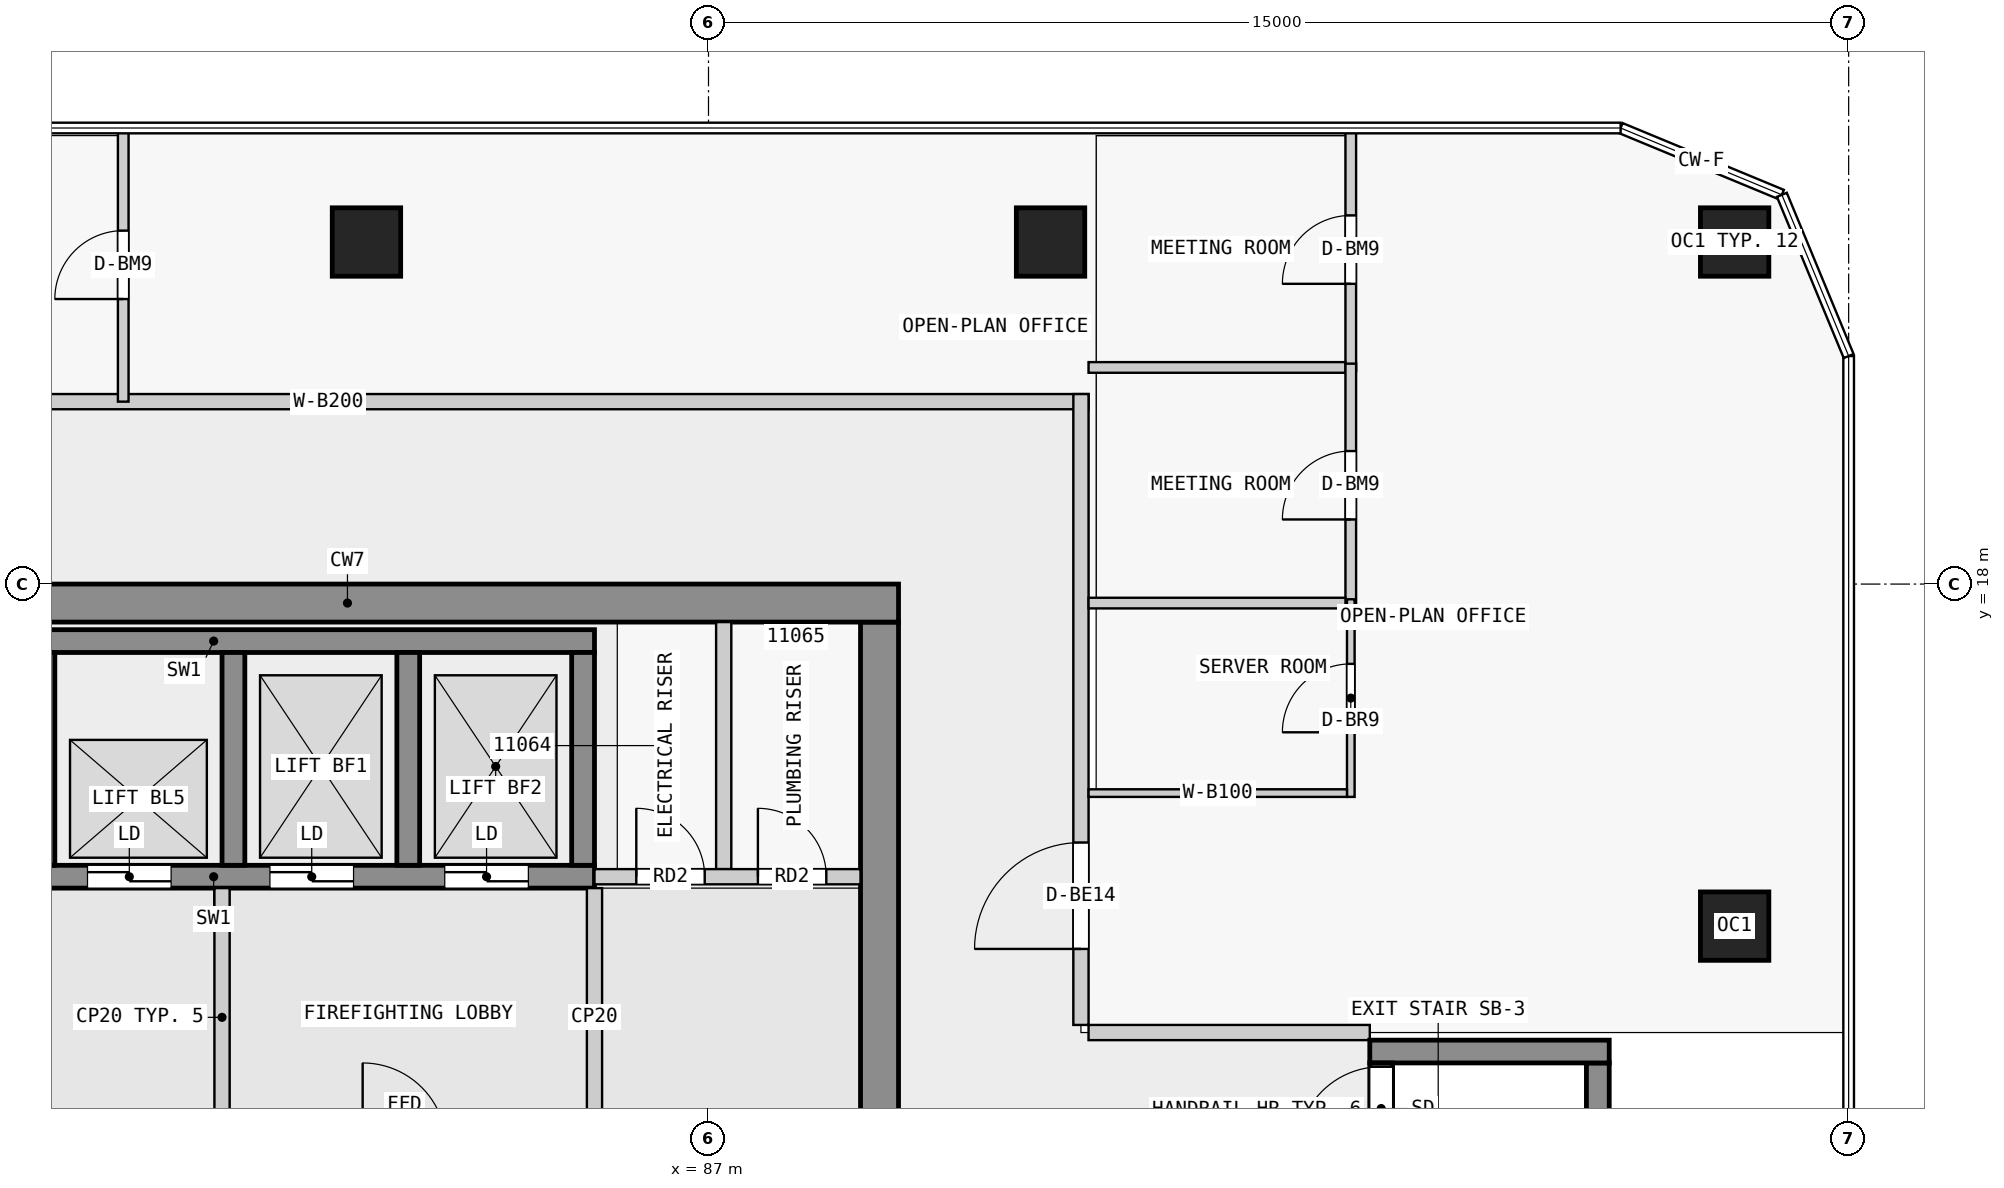
"""IFC4 building model, lengths in metres.
Left out: names, types, materials, properties, quantities, classifications, styles, units other than length and angle.
Written with IfcOpenShell. Run it as: python <this file> out.ifc"""

import sys

from ifc_helpers import new_model, si_unit, direction, frame, frame_2d, origin, origin_2d, place, context, subcontext, project, spatial, rectangle, extrude, element, fill, save


model = new_model("IFC4")
c1 = context("Model", 3, precision=1e-05, world=origin(), true_north=direction((0.0, 1.0)))
c2 = subcontext(c1, "Body", "Model", "MODEL_VIEW")
j1 = project(units=[si_unit("LENGTHUNIT", "METRE"), si_unit("PLANEANGLEUNIT", "RADIAN")], contexts=[c1])
p1 = place(None, origin())
s1 = spatial("IfcSite", under=j1, at=p1, CompositionType="ELEMENT")
p2 = place(p1, origin())
s2 = spatial("IfcBuilding", under=s1, at=p2, CompositionType="ELEMENT")
p3 = place(p2, frame((0.0, 0.0, 47.8)))
s3 = spatial("IfcBuildingStorey", under=s2, at=p3, CompositionType="ELEMENT", Elevation=47.8)
for number, where, z_axis, x_axis in (
    (1, (100.5, 13.5, 0.0), (0.0, 0.0, 1.0), (1.0, 0.0, 0.0)),
    (2, (100.5, 22.5, 0.0), (0.0, 0.0, 1.0), (1.0, 0.0, 0.0)),
    (3, (91.5, 22.5, 0.0), (0.0, 0.0, 1.0), (1.0, 0.0, 0.0)),
    (4, (82.5, 22.5, 0.0), (0.0, 0.0, 1.0), (1.0, 0.0, 0.0)),
):
    element("IfcColumn", number, at=place(p3, frame(where, z_axis=z_axis, x_axis=x_axis)), inside=s3, PredefinedType="COLUMN", context=c2, shape_type="SweptSolid", body=[
        extrude(rectangle(XDim=0.9, YDim=0.9, at=origin_2d()), origin(), (0.0, 0.0, 1.0), 3.5),
    ])
p4 = place(p3, frame((75.0, 17.75, 0.0), z_axis=(0.0, 0.0, 1.0), x_axis=(1.0, 0.0, 0.0)))
e5 = element("IfcWall", 5, at=p4, inside=s3, PredefinedType="SHEAR", context=c2, shape_type="SweptSolid", body=[
    extrude(rectangle(XDim=14.5, YDim=0.5, at=frame_2d((7.25, 0.0))), origin(), (0.0, 0.0, 1.0), 3.25),
])
p5 = place(p3, frame((89.25, 0.5, 0.0), z_axis=(0.0, 0.0, 1.0), x_axis=(0.0, 1.0, 0.0)))
e6 = element("IfcWall", 6, at=p5, inside=s3, PredefinedType="SHEAR", context=c2, shape_type="SweptSolid", body=[
    extrude(rectangle(XDim=17.0, YDim=0.5, at=frame_2d((8.5, 0.0))), origin(), (0.0, 0.0, 1.0), 3.25),
])
p6 = place(p5, frame((7.6, 0.0, 0.0)))
e7 = element("IfcOpeningElement", 7, at=p6, cuts=e6, PredefinedType="OPENING", context=c2, shape_type="SweptSolid", body=[
    extrude(rectangle(XDim=1.8, YDim=2.1, at=frame_2d((0.9, 1.05))), frame((0.0, 0.26, 0.0), z_axis=(0.0, -1.0, 0.0), x_axis=(1.0, 0.0, 0.0)), (0.0, 0.0, 1.0), 0.52),
])
p7 = place(p3, frame((75.48, 17.25, 0.0), z_axis=(0.0, 0.0, 1.0), x_axis=(1.0, 0.0, 0.0)))
e8 = element("IfcWall", 8, at=p7, inside=s3, PredefinedType="SHEAR", context=c2, shape_type="SweptSolid", body=[
    extrude(rectangle(XDim=10.02, YDim=0.3, at=frame_2d((5.01, 0.0))), origin(), (0.0, 0.0, 1.0), 3.25),
])
p8 = place(p3, frame((75.48, 14.15, 0.0), z_axis=(0.0, 0.0, 1.0), x_axis=(1.0, 0.0, 0.0)))
e9 = element("IfcWall", 9, at=p8, inside=s3, PredefinedType="SHEAR", context=c2, shape_type="SweptSolid", body=[
    extrude(rectangle(XDim=10.02, YDim=0.3, at=frame_2d((5.01, 0.0))), origin(), (0.0, 0.0, 1.0), 3.25),
])
p9 = place(p8, frame((0.85, 0.0, 0.0)))
e10 = element("IfcOpeningElement", 10, at=p9, cuts=e9, PredefinedType="OPENING", context=c2, shape_type="SweptSolid", body=[
    extrude(rectangle(XDim=1.1, YDim=2.1, at=frame_2d((0.55, 1.05))), frame((0.0, 0.16, 0.0), z_axis=(0.0, -1.0, 0.0), x_axis=(1.0, 0.0, 0.0)), (0.0, 0.0, 1.0), 0.32),
])
p10 = place(p8, frame((3.35, 0.0, 0.0)))
e11 = element("IfcOpeningElement", 11, at=p10, cuts=e9, PredefinedType="OPENING", context=c2, shape_type="SweptSolid", body=[
    extrude(rectangle(XDim=1.1, YDim=2.1, at=frame_2d((0.55, 1.05))), frame((0.0, 0.16, 0.0), z_axis=(0.0, -1.0, 0.0), x_axis=(1.0, 0.0, 0.0)), (0.0, 0.0, 1.0), 0.32),
])
p11 = place(p8, frame((5.75, 0.0, 0.0)))
e12 = element("IfcOpeningElement", 12, at=p11, cuts=e9, PredefinedType="OPENING", context=c2, shape_type="SweptSolid", body=[
    extrude(rectangle(XDim=1.1, YDim=2.1, at=frame_2d((0.55, 1.05))), frame((0.0, 0.16, 0.0), z_axis=(0.0, -1.0, 0.0), x_axis=(1.0, 0.0, 0.0)), (0.0, 0.0, 1.0), 0.32),
])
p12 = place(p8, frame((8.05, 0.0, 0.0)))
e13 = element("IfcOpeningElement", 13, at=p12, cuts=e9, PredefinedType="OPENING", context=c2, shape_type="SweptSolid", body=[
    extrude(rectangle(XDim=1.1, YDim=2.1, at=frame_2d((0.55, 1.05))), frame((0.0, 0.16, 0.0), z_axis=(0.0, -1.0, 0.0), x_axis=(1.0, 0.0, 0.0)), (0.0, 0.0, 1.0), 0.32),
])
for number, where, z_axis, x_axis in (
    (14, (78.25, 14.3, 0.0), (0.0, 0.0, 1.0), (0.0, 1.0, 0.0)),
    (15, (80.75, 14.3, 0.0), (0.0, 0.0, 1.0), (0.0, 1.0, 0.0)),
    (16, (83.05, 14.3, 0.0), (0.0, 0.0, 1.0), (0.0, 1.0, 0.0)),
    (17, (85.35, 14.3, 0.0), (0.0, 0.0, 1.0), (0.0, 1.0, 0.0)),
):
    element("IfcWall", number, at=place(p3, frame(where, z_axis=z_axis, x_axis=x_axis)), inside=s3, PredefinedType="SHEAR", context=c2, shape_type="SweptSolid", body=[
        extrude(rectangle(XDim=2.8, YDim=0.3, at=frame_2d((1.4, 0.0))), origin(), (0.0, 0.0, 1.0), 3.25),
    ])
p13 = place(p3, frame((95.85, 5.3, 0.0), z_axis=(0.0, 0.0, 1.0), x_axis=(0.0, 1.0, 0.0)))
e18 = element("IfcWall", 18, at=p13, inside=s3, PredefinedType="SHEAR", context=c2, shape_type="SweptSolid", body=[
    extrude(rectangle(XDim=6.4, YDim=0.3, at=frame_2d((3.2, 0.0))), origin(), (0.0, 0.0, 1.0), 3.25),
])
p14 = place(p13, frame((5.25, 0.0, 0.0)))
e19 = element("IfcOpeningElement", 19, at=p14, cuts=e18, PredefinedType="OPENING", context=c2, shape_type="SweptSolid", body=[
    extrude(rectangle(XDim=1.1, YDim=2.1, at=frame_2d((0.55, 1.05))), frame((0.0, 0.16, 0.0), z_axis=(0.0, -1.0, 0.0), x_axis=(1.0, 0.0, 0.0)), (0.0, 0.0, 1.0), 0.32),
])
p15 = place(p3, frame((98.7, 5.3, 0.0), z_axis=(0.0, 0.0, 1.0), x_axis=(0.0, 1.0, 0.0)))
e20 = element("IfcWall", 20, at=p15, inside=s3, PredefinedType="SHEAR", context=c2, shape_type="SweptSolid", body=[
    extrude(rectangle(XDim=6.4, YDim=0.3, at=frame_2d((3.2, 0.0))), origin(), (0.0, 0.0, 1.0), 3.25),
])
p16 = place(p3, frame((95.7, 11.85, 0.0), z_axis=(0.0, 0.0, 1.0), x_axis=(1.0, 0.0, 0.0)))
e21 = element("IfcWall", 21, at=p16, inside=s3, PredefinedType="SHEAR", context=c2, shape_type="SweptSolid", body=[
    extrude(rectangle(XDim=3.15, YDim=0.3, at=frame_2d((1.575, 0.0))), origin(), (0.0, 0.0, 1.0), 3.25),
])
for number, where, z_axis, x_axis in (
    (22, (80.6, 10.6, 0.0), (0.0, 0.0, 1.0), (0.0, 1.0, 0.0)),
    (23, (85.5, 10.6, 0.0), (0.0, 0.0, 1.0), (0.0, 1.0, 0.0)),
):
    element("IfcWall", number, at=place(p3, frame(where, z_axis=z_axis, x_axis=x_axis)), inside=s3, PredefinedType="PARTITIONING", context=c2, shape_type="SweptSolid", body=[
        extrude(rectangle(XDim=3.4, YDim=0.2, at=frame_2d((1.7, 0.0))), origin(), (0.0, 0.0, 1.0), 3.25),
    ])
p17 = place(p3, frame((85.5, 14.15, 0.0), z_axis=(0.0, 0.0, 1.0), x_axis=(1.0, 0.0, 0.0)))
e24 = element("IfcWall", 24, at=p17, inside=s3, PredefinedType="PARTITIONING", context=c2, shape_type="SweptSolid", body=[
    extrude(rectangle(XDim=3.5, YDim=0.2, at=frame_2d((1.75, 0.0))), origin(), (0.0, 0.0, 1.0), 3.25),
])
p18 = place(p17, frame((0.55, 0.0, 0.0)))
e25 = element("IfcOpeningElement", 25, at=p18, cuts=e24, PredefinedType="OPENING", context=c2, shape_type="SweptSolid", body=[
    extrude(rectangle(XDim=0.9, YDim=2.1, at=frame_2d((0.45, 1.05))), frame((0.0, 0.11, 0.0), z_axis=(0.0, -1.0, 0.0), x_axis=(1.0, 0.0, 0.0)), (0.0, 0.0, 1.0), 0.22),
])
p19 = place(p17, frame((2.15, 0.0, 0.0)))
e26 = element("IfcOpeningElement", 26, at=p19, cuts=e24, PredefinedType="OPENING", context=c2, shape_type="SweptSolid", body=[
    extrude(rectangle(XDim=0.9, YDim=2.1, at=frame_2d((0.45, 1.05))), frame((0.0, 0.11, 0.0), z_axis=(0.0, -1.0, 0.0), x_axis=(1.0, 0.0, 0.0)), (0.0, 0.0, 1.0), 0.22),
])
p20 = place(p3, frame((87.2, 14.25, 0.0), z_axis=(0.0, 0.0, 1.0), x_axis=(0.0, 1.0, 0.0)))
e27 = element("IfcWall", 27, at=p20, inside=s3, PredefinedType="PARTITIONING", context=c2, shape_type="SweptSolid", body=[
    extrude(rectangle(XDim=3.25, YDim=0.2, at=frame_2d((1.625, 0.0))), origin(), (0.0, 0.0, 1.0), 3.25),
])
p21 = place(p3, frame((72.0, 20.4, 0.0), z_axis=(0.0, 0.0, 1.0), x_axis=(1.0, 0.0, 0.0)))
e28 = element("IfcWall", 28, at=p21, inside=s3, PredefinedType="PARTITIONING", context=c2, shape_type="SweptSolid", body=[
    extrude(rectangle(XDim=20.0, YDim=0.2, at=frame_2d((10.0, 0.0))), origin(), (0.0, 0.0, 1.0), 3.25),
])
p22 = place(p3, frame((91.9, 12.2, 0.0), z_axis=(0.0, 0.0, 1.0), x_axis=(0.0, 1.0, 0.0)))
e29 = element("IfcWall", 29, at=p22, inside=s3, PredefinedType="PARTITIONING", context=c2, shape_type="SweptSolid", body=[
    extrude(rectangle(XDim=8.3, YDim=0.2, at=frame_2d((4.15, 0.0))), origin(), (0.0, 0.0, 1.0), 3.25),
])
p23 = place(p22, frame((1.0, 0.0, 0.0)))
e30 = element("IfcOpeningElement", 30, at=p23, cuts=e29, PredefinedType="OPENING", context=c2, shape_type="SweptSolid", body=[
    extrude(rectangle(XDim=1.4, YDim=2.4, at=frame_2d((0.7, 1.2))), frame((0.0, 0.11, 0.0), z_axis=(0.0, -1.0, 0.0), x_axis=(1.0, 0.0, 0.0)), (0.0, 0.0, 1.0), 0.22),
])
p24 = place(p3, frame((92.0, 12.1, 0.0), z_axis=(0.0, 0.0, 1.0), x_axis=(1.0, 0.0, 0.0)))
e31 = element("IfcWall", 31, at=p24, inside=s3, PredefinedType="PARTITIONING", context=c2, shape_type="SweptSolid", body=[
    extrude(rectangle(XDim=3.7, YDim=0.2, at=frame_2d((1.85, 0.0))), origin(), (0.0, 0.0, 1.0), 3.25),
])
p25 = place(p3, frame((95.45, 20.8, 0.0), z_axis=(0.0, 0.0, 1.0), x_axis=(0.0, 1.0, 0.0)))
e32 = element("IfcWall", 32, at=p25, inside=s3, PredefinedType="PARTITIONING", context=c2, shape_type="SweptSolid", body=[
    extrude(rectangle(XDim=3.2, YDim=0.14, at=frame_2d((1.6, 0.0))), origin(), (0.0, 0.0, 1.0), 3.25),
])
p26 = place(p25, frame((1.15, 0.0, 0.0)))
e33 = element("IfcOpeningElement", 33, at=p26, cuts=e32, PredefinedType="OPENING", context=c2, shape_type="SweptSolid", body=[
    extrude(rectangle(XDim=0.9, YDim=2.4, at=frame_2d((0.45, 1.2))), frame((0.0, 0.08, 0.0), z_axis=(0.0, -1.0, 0.0), x_axis=(1.0, 0.0, 0.0)), (0.0, 0.0, 1.0), 0.16),
])
p27 = place(p3, frame((92.0, 20.85, 0.0), z_axis=(0.0, 0.0, 1.0), x_axis=(1.0, 0.0, 0.0)))
e34 = element("IfcWall", 34, at=p27, inside=s3, PredefinedType="PARTITIONING", context=c2, shape_type="SweptSolid", body=[
    extrude(rectangle(XDim=3.38, YDim=0.14, at=frame_2d((1.69, 0.0))), origin(), (0.0, 0.0, 1.0), 3.25),
])
p28 = place(p3, frame((95.45, 17.7, 0.0), z_axis=(0.0, 0.0, 1.0), x_axis=(0.0, 1.0, 0.0)))
e35 = element("IfcWall", 35, at=p28, inside=s3, PredefinedType="PARTITIONING", context=c2, shape_type="SweptSolid", body=[
    extrude(rectangle(XDim=3.2, YDim=0.14, at=frame_2d((1.6, 0.0))), origin(), (0.0, 0.0, 1.0), 3.25),
])
p29 = place(p28, frame((1.15, 0.0, 0.0)))
e36 = element("IfcOpeningElement", 36, at=p29, cuts=e35, PredefinedType="OPENING", context=c2, shape_type="SweptSolid", body=[
    extrude(rectangle(XDim=0.9, YDim=2.4, at=frame_2d((0.45, 1.2))), frame((0.0, 0.08, 0.0), z_axis=(0.0, -1.0, 0.0), x_axis=(1.0, 0.0, 0.0)), (0.0, 0.0, 1.0), 0.16),
])
p30 = place(p3, frame((92.0, 17.75, 0.0), z_axis=(0.0, 0.0, 1.0), x_axis=(1.0, 0.0, 0.0)))
e37 = element("IfcWall", 37, at=p30, inside=s3, PredefinedType="PARTITIONING", context=c2, shape_type="SweptSolid", body=[
    extrude(rectangle(XDim=3.38, YDim=0.14, at=frame_2d((1.69, 0.0))), origin(), (0.0, 0.0, 1.0), 3.25),
])
p31 = place(p3, frame((95.45, 15.2, 0.0), z_axis=(0.0, 0.0, 1.0), x_axis=(0.0, 1.0, 0.0)))
e38 = element("IfcWall", 38, at=p31, inside=s3, PredefinedType="PARTITIONING", context=c2, shape_type="SweptSolid", body=[
    extrude(rectangle(XDim=2.6, YDim=0.1, at=frame_2d((1.3, 0.0))), origin(), (0.0, 0.0, 1.0), 3.25),
])
p32 = place(p31, frame((0.85, 0.0, 0.0)))
e39 = element("IfcOpeningElement", 39, at=p32, cuts=e38, PredefinedType="OPENING", context=c2, shape_type="SweptSolid", body=[
    extrude(rectangle(XDim=0.9, YDim=2.1, at=frame_2d((0.45, 1.05))), frame((0.0, 0.06, 0.0), z_axis=(0.0, -1.0, 0.0), x_axis=(1.0, 0.0, 0.0)), (0.0, 0.0, 1.0), 0.12),
])
p33 = place(p3, frame((92.0, 15.25, 0.0), z_axis=(0.0, 0.0, 1.0), x_axis=(1.0, 0.0, 0.0)))
e40 = element("IfcWall", 40, at=p33, inside=s3, PredefinedType="PARTITIONING", context=c2, shape_type="SweptSolid", body=[
    extrude(rectangle(XDim=3.4, YDim=0.1, at=frame_2d((1.7, 0.0))), origin(), (0.0, 0.0, 1.0), 3.25),
])
p34 = place(p3, frame((79.3, 20.4, 0.0), z_axis=(0.0, 0.0, 1.0), x_axis=(0.0, 1.0, 0.0)))
e41 = element("IfcWall", 41, at=p34, inside=s3, PredefinedType="PARTITIONING", context=c2, shape_type="SweptSolid", body=[
    extrude(rectangle(XDim=3.6, YDim=0.14, at=frame_2d((1.8, 0.0))), origin(), (0.0, 0.0, 1.0), 3.25),
])
p35 = place(p34, frame((1.35, 0.0, 0.0)))
e42 = element("IfcOpeningElement", 42, at=p35, cuts=e41, PredefinedType="OPENING", context=c2, shape_type="SweptSolid", body=[
    extrude(rectangle(XDim=0.9, YDim=2.4, at=frame_2d((0.45, 1.2))), frame((0.0, 0.08, 0.0), z_axis=(0.0, -1.0, 0.0), x_axis=(1.0, 0.0, 0.0)), (0.0, 0.0, 1.0), 0.16),
])
p36 = place(p10, origin())
e43 = element("IfcDoor", 43, at=p36, inside=s3, OperationType="DOUBLE_DOOR_SLIDING", PredefinedType="DOOR", context=c2, shape_type="SweptSolid", body=[
    extrude(rectangle(XDim=1.1, YDim=2.1, at=frame_2d((0.55, 1.05))), frame((0.0, 0.025, 0.0), z_axis=(0.0, -1.0, 0.0), x_axis=(1.0, 0.0, 0.0)), (0.0, 0.0, 1.0), 0.05),
])
fill(e11, e43)
p37 = place(p11, origin())
e44 = element("IfcDoor", 44, at=p37, inside=s3, OperationType="DOUBLE_DOOR_SLIDING", PredefinedType="DOOR", context=c2, shape_type="SweptSolid", body=[
    extrude(rectangle(XDim=1.1, YDim=2.1, at=frame_2d((0.55, 1.05))), frame((0.0, 0.025, 0.0), z_axis=(0.0, -1.0, 0.0), x_axis=(1.0, 0.0, 0.0)), (0.0, 0.0, 1.0), 0.05),
])
fill(e12, e44)
p38 = place(p12, origin())
e45 = element("IfcDoor", 45, at=p38, inside=s3, OperationType="DOUBLE_DOOR_SLIDING", PredefinedType="DOOR", context=c2, shape_type="SweptSolid", body=[
    extrude(rectangle(XDim=1.1, YDim=2.1, at=frame_2d((0.55, 1.05))), frame((0.0, 0.025, 0.0), z_axis=(0.0, -1.0, 0.0), x_axis=(1.0, 0.0, 0.0)), (0.0, 0.0, 1.0), 0.05),
])
fill(e13, e45)
p39 = place(p14, origin())
e46 = element("IfcDoor", 46, at=p39, inside=s3, OperationType="SINGLE_SWING_LEFT", PredefinedType="DOOR", context=c2, shape_type="SweptSolid", body=[
    extrude(rectangle(XDim=1.1, YDim=2.1, at=frame_2d((0.55, 1.05))), frame((0.0, 0.025, 0.0), z_axis=(0.0, -1.0, 0.0), x_axis=(1.0, 0.0, 0.0)), (0.0, 0.0, 1.0), 0.05),
])
fill(e19, e46)
p40 = place(p18, origin())
e47 = element("IfcDoor", 47, at=p40, inside=s3, OperationType="SINGLE_SWING_LEFT", PredefinedType="DOOR", context=c2, shape_type="SweptSolid", body=[
    extrude(rectangle(XDim=0.9, YDim=2.1, at=frame_2d((0.45, 1.05))), frame((0.0, 0.025, 0.0), z_axis=(0.0, -1.0, 0.0), x_axis=(1.0, 0.0, 0.0)), (0.0, 0.0, 1.0), 0.05),
])
fill(e25, e47)
p41 = place(p19, origin())
e48 = element("IfcDoor", 48, at=p41, inside=s3, OperationType="SINGLE_SWING_LEFT", PredefinedType="DOOR", context=c2, shape_type="SweptSolid", body=[
    extrude(rectangle(XDim=0.9, YDim=2.1, at=frame_2d((0.45, 1.05))), frame((0.0, 0.025, 0.0), z_axis=(0.0, -1.0, 0.0), x_axis=(1.0, 0.0, 0.0)), (0.0, 0.0, 1.0), 0.05),
])
fill(e26, e48)
p42 = place(p23, origin())
e49 = element("IfcDoor", 49, at=p42, inside=s3, OperationType="DOUBLE_DOOR_SINGLE_SWING", PredefinedType="DOOR", context=c2, shape_type="SweptSolid", body=[
    extrude(rectangle(XDim=1.4, YDim=2.4, at=frame_2d((0.7, 1.2))), frame((0.0, 0.025, 0.0), z_axis=(0.0, -1.0, 0.0), x_axis=(1.0, 0.0, 0.0)), (0.0, 0.0, 1.0), 0.05),
])
fill(e30, e49)
p43 = place(p26, origin())
e50 = element("IfcDoor", 50, at=p43, inside=s3, OperationType="SINGLE_SWING_LEFT", PredefinedType="DOOR", context=c2, shape_type="SweptSolid", body=[
    extrude(rectangle(XDim=0.9, YDim=2.4, at=frame_2d((0.45, 1.2))), frame((0.0, 0.025, 0.0), z_axis=(0.0, -1.0, 0.0), x_axis=(1.0, 0.0, 0.0)), (0.0, 0.0, 1.0), 0.05),
])
fill(e33, e50)
p44 = place(p29, origin())
e51 = element("IfcDoor", 51, at=p44, inside=s3, OperationType="SINGLE_SWING_LEFT", PredefinedType="DOOR", context=c2, shape_type="SweptSolid", body=[
    extrude(rectangle(XDim=0.9, YDim=2.4, at=frame_2d((0.45, 1.2))), frame((0.0, 0.025, 0.0), z_axis=(0.0, -1.0, 0.0), x_axis=(1.0, 0.0, 0.0)), (0.0, 0.0, 1.0), 0.05),
])
fill(e36, e51)
p45 = place(p32, origin())
e52 = element("IfcDoor", 52, at=p45, inside=s3, OperationType="SINGLE_SWING_LEFT", PredefinedType="DOOR", context=c2, shape_type="SweptSolid", body=[
    extrude(rectangle(XDim=0.9, YDim=2.1, at=frame_2d((0.45, 1.05))), frame((0.0, 0.025, 0.0), z_axis=(0.0, -1.0, 0.0), x_axis=(1.0, 0.0, 0.0)), (0.0, 0.0, 1.0), 0.05),
])
fill(e39, e52)
p46 = place(p35, origin())
e53 = element("IfcDoor", 53, at=p46, inside=s3, OperationType="SINGLE_SWING_LEFT", PredefinedType="DOOR", context=c2, shape_type="SweptSolid", body=[
    extrude(rectangle(XDim=0.9, YDim=2.4, at=frame_2d((0.45, 1.2))), frame((0.0, 0.025, 0.0), z_axis=(0.0, -1.0, 0.0), x_axis=(1.0, 0.0, 0.0)), (0.0, 0.0, 1.0), 0.05),
])
fill(e42, e53)
save(model, sys.argv[1])
